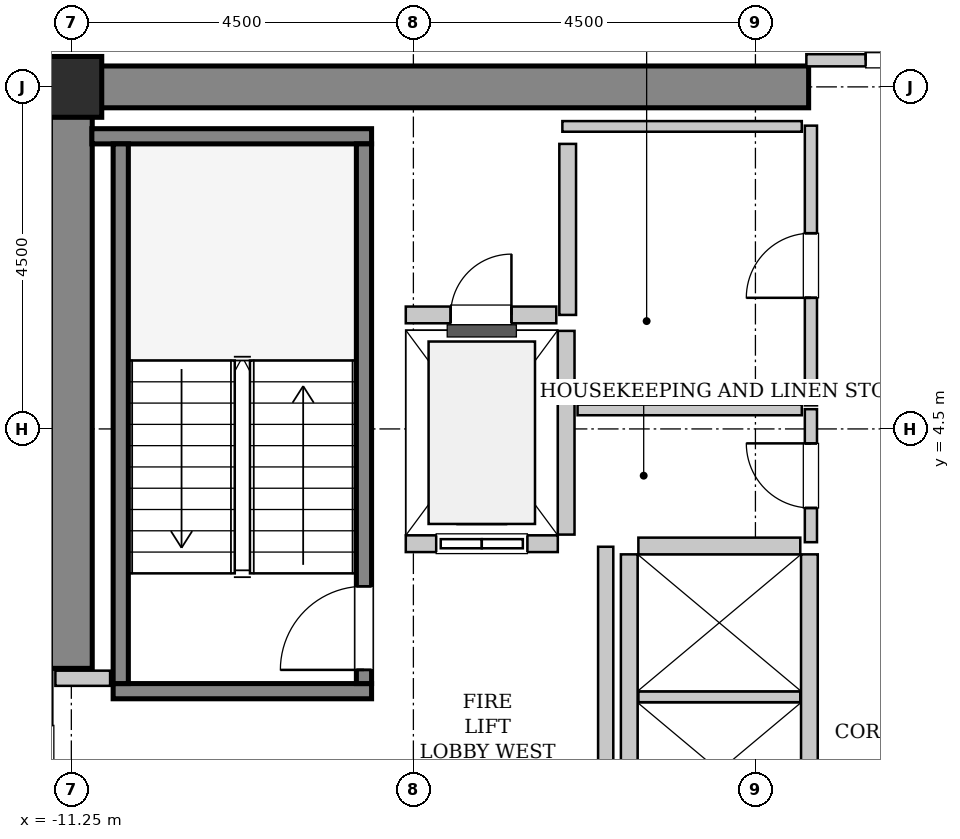
"""IFC4 building model, lengths in metres.
Left out: names, types, materials, properties, quantities, classifications, styles, units other than length and angle.
Written with IfcOpenShell. Run it as: python <this file> out.ifc"""

import sys

from ifc_helpers import new_model, si_unit, direction, frame, frame_2d, origin, origin_2d, place, context, subcontext, project, spatial, rectangle, hollow_rectangle, extrude, source, transform, mapped, element, fill, save


model = new_model("IFC4")
c1 = context("Model", 3, precision=1e-05, world=origin(), true_north=direction((0.0, 1.0)))
c2 = subcontext(c1, "Body", "Model", "MODEL_VIEW")
j1 = project(units=[si_unit("LENGTHUNIT", "METRE"), si_unit("PLANEANGLEUNIT", "RADIAN")], contexts=[c1])
p1 = place(None, origin())
s1 = spatial("IfcSite", under=j1, at=p1, CompositionType="ELEMENT")
p2 = place(p1, origin())
s2 = spatial("IfcBuilding", under=s1, at=p2, CompositionType="ELEMENT")
p3 = place(p2, frame((0.0, 0.0, 198.2)))
s3 = spatial("IfcBuildingStorey", under=s2, at=p3, CompositionType="ELEMENT", Elevation=198.2)
m1 = source(origin(), c2, "Body", "SweptSolid", [
    extrude(rectangle(XDim=9.975, YDim=0.55, at=frame_2d((4.987, 0.0))), origin(), (0.0, 0.0, 1.0), 3.8),
])
p4 = place(p3, frame((-11.525, 9.0, 0.0), z_axis=(0.0, 0.0, 1.0), x_axis=(1.0, 0.0, 0.0)))
e1 = element("IfcWall", 1, at=p4, inside=s3, PredefinedType="SHEAR", context=c2, shape_type="MappedRepresentation", body=[
    mapped(m1, transform((0.0, 0.0, 0.0), x_axis=(1.0, 0.0, 0.0), y_axis=(0.0, 1.0, 0.0), z_axis=(0.0, 0.0, 1.0), scale=1.0)),
])
m2 = source(origin(), c2, "Body", "SweptSolid", [
    extrude(rectangle(XDim=7.375, YDim=0.55, at=frame_2d((3.688, 0.0))), origin(), (0.0, 0.0, 1.0), 3.8),
])
p5 = place(p3, frame((-11.25, 1.35, 0.0), z_axis=(0.0, 0.0, 1.0), x_axis=(0.0, 1.0, 0.0)))
e2 = element("IfcWall", 2, at=p5, inside=s3, PredefinedType="SHEAR", context=c2, shape_type="MappedRepresentation", body=[
    mapped(m2, transform((0.0, 0.0, 0.0), x_axis=(1.0, 0.0, 0.0), y_axis=(0.0, 1.0, 0.0), z_axis=(0.0, 0.0, 1.0), scale=1.0)),
])
m3 = source(origin(), c2, "Body", "SweptSolid", [
    extrude(hollow_rectangle(XDim=0.8, YDim=0.8, WallThickness=0.04, InnerFilletRadius=0.04, OuterFilletRadius=0.08, at=origin_2d()), origin(), (0.0, 0.0, 1.0), 3.8),
])
p6 = place(p3, frame((-11.25, 9.0, 0.0), z_axis=(0.0, 0.0, 1.0), x_axis=(1.0, 0.0, 0.0)))
e3 = element("IfcColumn", 3, at=p6, inside=s3, PredefinedType="COLUMN", context=c2, shape_type="MappedRepresentation", body=[
    mapped(m3, transform((0.0, 0.0, 0.0), x_axis=(1.0, 0.0, 0.0), y_axis=(0.0, 1.0, 0.0), z_axis=(0.0, 0.0, 1.0), scale=1.0)),
])
m4 = source(origin(), c2, "Body", "SweptSolid", [
    extrude(rectangle(XDim=3.4, YDim=0.2, at=frame_2d((1.7, 0.0))), origin(), (0.0, 0.0, 1.0), 3.8),
])
p7 = place(p3, frame((-7.3, 1.05, 0.0), z_axis=(0.0, 0.0, 1.0), x_axis=(-1.0, 0.0, 0.0)))
e4 = element("IfcWall", 4, at=p7, inside=s3, PredefinedType="SOLIDWALL", context=c2, shape_type="MappedRepresentation", body=[
    mapped(m4, transform((0.0, 0.0, 0.0), x_axis=(1.0, 0.0, 0.0), y_axis=(0.0, 1.0, 0.0), z_axis=(0.0, 0.0, 1.0), scale=1.0)),
])
m5 = source(origin(), c2, "Body", "SweptSolid", [
    extrude(rectangle(XDim=3.68, YDim=0.2, at=frame_2d((1.84, 0.0))), origin(), (0.0, 0.0, 1.0), 3.8),
])
p8 = place(p3, frame((-7.3, 8.35, 0.0), z_axis=(0.0, 0.0, 1.0), x_axis=(-1.0, 0.0, 0.0)))
e5 = element("IfcWall", 5, at=p8, inside=s3, PredefinedType="SOLIDWALL", context=c2, shape_type="MappedRepresentation", body=[
    mapped(m5, transform((0.0, 0.0, 0.0), x_axis=(1.0, 0.0, 0.0), y_axis=(0.0, 1.0, 0.0), z_axis=(0.0, 0.0, 1.0), scale=1.0)),
])
m6 = source(origin(), c2, "Body", "SweptSolid", [
    extrude(rectangle(XDim=7.1, YDim=0.2, at=frame_2d((3.55, 0.0))), origin(), (0.0, 0.0, 1.0), 3.8),
])
p9 = place(p3, frame((-7.4, 1.15, 0.0), z_axis=(0.0, 0.0, 1.0), x_axis=(0.0, 1.0, 0.0)))
e6 = element("IfcWall", 6, at=p9, inside=s3, PredefinedType="SOLIDWALL", context=c2, shape_type="MappedRepresentation", body=[
    mapped(m6, transform((0.0, 0.0, 0.0), x_axis=(1.0, 0.0, 0.0), y_axis=(0.0, 1.0, 0.0), z_axis=(0.0, 0.0, 1.0), scale=1.0)),
])
p10 = place(p9, frame((0.18, 0.0, 0.0)))
e7 = element("IfcOpeningElement", 7, at=p10, cuts=e6, PredefinedType="OPENING", context=c2, shape_type="SweptSolid", body=[
    extrude(rectangle(XDim=1.1, YDim=2.15, at=frame_2d((0.55, 1.075))), frame((0.0, 0.11, 0.0), z_axis=(0.0, -1.0, 0.0), x_axis=(1.0, 0.0, 0.0)), (0.0, 0.0, 1.0), 0.22),
])
p11 = place(p3, frame((-10.6, 1.15, 0.0), z_axis=(0.0, 0.0, 1.0), x_axis=(0.0, 1.0, 0.0)))
e8 = element("IfcWall", 8, at=p11, inside=s3, PredefinedType="SOLIDWALL", context=c2, shape_type="MappedRepresentation", body=[
    mapped(m6, transform((0.0, 0.0, 0.0), x_axis=(1.0, 0.0, 0.0), y_axis=(0.0, 1.0, 0.0), z_axis=(0.0, 0.0, 1.0), scale=1.0)),
])
m7 = source(origin(), c2, "Body", "SweptSolid", [
    extrude(rectangle(XDim=2.0, YDim=0.22, at=frame_2d((1.0, 0.0))), origin(), (0.0, 0.0, 1.0), 3.485),
])
p12 = place(p3, frame((-6.85, 2.99, 0.0), z_axis=(0.0, 0.0, 1.0), x_axis=(1.0, 0.0, 0.0)))
e9 = element("IfcWall", 9, at=p12, inside=s3, PredefinedType="SOLIDWALL", context=c2, shape_type="MappedRepresentation", body=[
    mapped(m7, transform((0.0, 0.0, 0.0), x_axis=(1.0, 0.0, 0.0), y_axis=(0.0, 1.0, 0.0), z_axis=(0.0, 0.0, 1.0), scale=1.0)),
])
p13 = place(p12, frame((0.4, 0.0, 0.0)))
e10 = element("IfcOpeningElement", 10, at=p13, cuts=e9, PredefinedType="OPENING", context=c2, shape_type="SweptSolid", body=[
    extrude(rectangle(XDim=1.2, YDim=2.2, at=frame_2d((0.6, 1.1))), frame((0.0, 0.12, 0.0), z_axis=(0.0, -1.0, 0.0), x_axis=(1.0, 0.0, 0.0)), (0.0, 0.0, 1.0), 0.24),
])
m8 = source(origin(), c2, "Body", "SweptSolid", [
    extrude(rectangle(XDim=2.68, YDim=0.22, at=frame_2d((1.34, 0.0))), origin(), (0.0, 0.0, 1.0), 3.485),
])
p14 = place(p3, frame((-4.74, 3.11, 0.0), z_axis=(0.0, 0.0, 1.0), x_axis=(0.0, 1.0, 0.0)))
e11 = element("IfcWall", 11, at=p14, inside=s3, PredefinedType="SOLIDWALL", context=c2, shape_type="MappedRepresentation", body=[
    mapped(m8, transform((0.0, 0.0, 0.0), x_axis=(1.0, 0.0, 0.0), y_axis=(0.0, 1.0, 0.0), z_axis=(0.0, 0.0, 1.0), scale=1.0)),
])
m9 = source(origin(), c2, "Body", "SweptSolid", [
    extrude(rectangle(XDim=5.7, YDim=0.22, at=frame_2d((2.85, 0.0))), origin(), (0.0, 0.0, 1.0), 3.485),
])
for number, where, z_axis, x_axis in (
    (12, (-1.54, -2.85, 0.0), (0.0, 0.0, 1.0), (0.0, 1.0, 0.0)),
    (13, (-3.91, 2.85, 0.0), (0.0, 0.0, 1.0), (0.0, -1.0, 0.0)),
):
    element("IfcWall", number, at=place(p3, frame(where, z_axis=z_axis, x_axis=x_axis)), inside=s3, PredefinedType="SOLIDWALL", context=c2, shape_type="MappedRepresentation", body=[
        mapped(m9, transform((0.0, 0.0, 0.0), x_axis=(1.0, 0.0, 0.0), y_axis=(0.0, 1.0, 0.0), z_axis=(0.0, 0.0, 1.0), scale=1.0)),
    ])
m10 = source(origin(), c2, "Body", "SweptSolid", [
    extrude(rectangle(XDim=2.13, YDim=0.14, at=frame_2d((1.065, 0.0))), origin(), (0.0, 0.0, 1.0), 3.485),
])
p15 = place(p3, frame((-3.79, 0.975, 0.0), z_axis=(0.0, 0.0, 1.0), x_axis=(1.0, 0.0, 0.0)))
e14 = element("IfcWall", 14, at=p15, inside=s3, PredefinedType="PARTITIONING", context=c2, shape_type="MappedRepresentation", body=[
    mapped(m10, transform((0.0, 0.0, 0.0), x_axis=(1.0, 0.0, 0.0), y_axis=(0.0, 1.0, 0.0), z_axis=(0.0, 0.0, 1.0), scale=1.0)),
])
m11 = source(origin(), c2, "Body", "SweptSolid", [
    extrude(rectangle(XDim=2.13, YDim=0.22, at=frame_2d((1.065, 0.0))), origin(), (0.0, 0.0, 1.0), 3.485),
])
p16 = place(p3, frame((-1.66, 2.96, 0.0), z_axis=(0.0, 0.0, 1.0), x_axis=(-1.0, 0.0, 0.0)))
e15 = element("IfcWall", 15, at=p16, inside=s3, PredefinedType="SOLIDWALL", context=c2, shape_type="MappedRepresentation", body=[
    mapped(m11, transform((0.0, 0.0, 0.0), x_axis=(1.0, 0.0, 0.0), y_axis=(0.0, 1.0, 0.0), z_axis=(0.0, 0.0, 1.0), scale=1.0)),
])
m12 = source(origin(), c2, "Body", "SweptSolid", [
    extrude(rectangle(XDim=2.25, YDim=0.22, at=frame_2d((1.125, 0.0))), origin(), (0.0, 0.0, 1.0), 3.485),
])
p17 = place(p3, frame((-4.72, 6.0, 0.0), z_axis=(0.0, 0.0, 1.0), x_axis=(0.0, 1.0, 0.0)))
e16 = element("IfcWall", 16, at=p17, inside=s3, PredefinedType="SOLIDWALL", context=c2, shape_type="MappedRepresentation", body=[
    mapped(m12, transform((0.0, 0.0, 0.0), x_axis=(1.0, 0.0, 0.0), y_axis=(0.0, 1.0, 0.0), z_axis=(0.0, 0.0, 1.0), scale=1.0)),
])
m13 = source(origin(), c2, "Body", "SweptSolid", [
    extrude(rectangle(XDim=1.98, YDim=0.22, at=frame_2d((0.99, 0.0))), origin(), (0.0, 0.0, 1.0), 3.485),
])
p18 = place(p3, frame((-6.85, 6.0, 0.0), z_axis=(0.0, 0.0, 1.0), x_axis=(1.0, 0.0, 0.0)))
e17 = element("IfcWall", 17, at=p18, inside=s3, PredefinedType="SOLIDWALL", context=c2, shape_type="MappedRepresentation", body=[
    mapped(m13, transform((0.0, 0.0, 0.0), x_axis=(1.0, 0.0, 0.0), y_axis=(0.0, 1.0, 0.0), z_axis=(0.0, 0.0, 1.0), scale=1.0)),
])
p19 = place(p18, frame((0.59, 0.0, 0.0)))
e18 = element("IfcOpeningElement", 18, at=p19, cuts=e17, PredefinedType="OPENING", context=c2, shape_type="SweptSolid", body=[
    extrude(rectangle(XDim=0.8, YDim=2.0, at=frame_2d((0.4, 1.0))), frame((0.0, 0.12, 0.0), z_axis=(0.0, -1.0, 0.0), x_axis=(1.0, 0.0, 0.0)), (0.0, 0.0, 1.0), 0.24),
])
m14 = source(origin(), c2, "Body", "SweptSolid", [
    extrude(rectangle(XDim=5.9, YDim=0.2, at=frame_2d((2.95, 0.0))), origin(), (0.0, 0.0, 1.0), 3.485),
])
p20 = place(p3, frame((-4.22, -2.95, 0.0), z_axis=(0.0, 0.0, 1.0), x_axis=(0.0, 1.0, 0.0)))
e19 = element("IfcWall", 19, at=p20, inside=s3, PredefinedType="PARTITIONING", context=c2, shape_type="MappedRepresentation", body=[
    mapped(m14, transform((0.0, 0.0, 0.0), x_axis=(1.0, 0.0, 0.0), y_axis=(0.0, 1.0, 0.0), z_axis=(0.0, 0.0, 1.0), scale=1.0)),
])
m15 = source(origin(), c2, "Body", "SweptSolid", [
    extrude(rectangle(XDim=0.72, YDim=0.2, at=frame_2d((0.36, 0.0))), origin(), (0.0, 0.0, 1.0), 3.485),
])
p21 = place(p3, frame((-11.46, 1.22, 0.0), z_axis=(0.0, 0.0, 1.0), x_axis=(1.0, 0.0, 0.0)))
e20 = element("IfcWall", 20, at=p21, inside=s3, PredefinedType="PARTITIONING", context=c2, shape_type="MappedRepresentation", body=[
    mapped(m15, transform((0.0, 0.0, 0.0), x_axis=(1.0, 0.0, 0.0), y_axis=(0.0, 1.0, 0.0), z_axis=(0.0, 0.0, 1.0), scale=1.0)),
])
m16 = source(origin(), c2, "Body", "SweptSolid", [
    extrude(rectangle(XDim=3.16, YDim=0.16, at=frame_2d((1.58, 0.0))), origin(), (0.0, 0.0, 1.0), 2.375),
])
p22 = place(p3, frame((-1.58, 9.35, 0.0), z_axis=(0.0, 0.0, 1.0), x_axis=(1.0, 0.0, 0.0)))
e21 = element("IfcWall", 21, at=p22, inside=s3, PredefinedType="PARTITIONING", context=c2, shape_type="MappedRepresentation", body=[
    mapped(m16, transform((0.0, 0.0, 0.0), x_axis=(1.0, 0.0, 0.0), y_axis=(0.0, 1.0, 0.0), z_axis=(0.0, 0.0, 1.0), scale=1.0)),
])
p23 = place(p22, frame((0.78, 0.0, 0.0)))
e22 = element("IfcOpeningElement", 22, at=p23, cuts=e21, PredefinedType="OPENING", context=c2, shape_type="SweptSolid", body=[
    extrude(rectangle(XDim=1.6, YDim=2.3, at=frame_2d((0.8, 1.15))), frame((0.0, 0.09, 0.0), z_axis=(0.0, -1.0, 0.0), x_axis=(1.0, 0.0, 0.0)), (0.0, 0.0, 1.0), 0.18),
])
m17 = source(origin(), c2, "Body", "SweptSolid", [
    extrude(rectangle(XDim=1.75, YDim=0.16, at=frame_2d((0.875, 0.0))), origin(), (0.0, 0.0, 1.0), 3.485),
])
p24 = place(p3, frame((-1.52, 3.01, 0.0), z_axis=(0.0, 0.0, 1.0), x_axis=(0.0, 1.0, 0.0)))
e23 = element("IfcWall", 23, at=p24, inside=s3, PredefinedType="PARTITIONING", context=c2, shape_type="MappedRepresentation", body=[
    mapped(m17, transform((0.0, 0.0, 0.0), x_axis=(1.0, 0.0, 0.0), y_axis=(0.0, 1.0, 0.0), z_axis=(0.0, 0.0, 1.0), scale=1.0)),
])
p25 = place(p24, frame((0.45, 0.0, 0.0)))
e24 = element("IfcOpeningElement", 24, at=p25, cuts=e23, PredefinedType="OPENING", context=c2, shape_type="SweptSolid", body=[
    extrude(rectangle(XDim=0.85, YDim=2.1, at=frame_2d((0.425, 1.05))), frame((0.0, 0.09, 0.0), z_axis=(0.0, -1.0, 0.0), x_axis=(1.0, 0.0, 0.0)), (0.0, 0.0, 1.0), 0.18),
])
m18 = source(origin(), c2, "Body", "SweptSolid", [
    extrude(rectangle(XDim=2.95, YDim=0.14, at=frame_2d((1.475, 0.0))), origin(), (0.0, 0.0, 1.0), 3.485),
])
p26 = place(p3, frame((-4.59, 4.75, 0.0), z_axis=(0.0, 0.0, 1.0), x_axis=(1.0, 0.0, 0.0)))
e25 = element("IfcWall", 25, at=p26, inside=s3, PredefinedType="PARTITIONING", context=c2, shape_type="MappedRepresentation", body=[
    mapped(m18, transform((0.0, 0.0, 0.0), x_axis=(1.0, 0.0, 0.0), y_axis=(0.0, 1.0, 0.0), z_axis=(0.0, 0.0, 1.0), scale=1.0)),
])
m19 = source(origin(), c2, "Body", "SweptSolid", [
    extrude(rectangle(XDim=3.68, YDim=0.16, at=frame_2d((1.84, 0.0))), origin(), (0.0, 0.0, 1.0), 3.485),
])
p27 = place(p3, frame((-1.52, 4.81, 0.0), z_axis=(0.0, 0.0, 1.0), x_axis=(0.0, 1.0, 0.0)))
e26 = element("IfcWall", 26, at=p27, inside=s3, PredefinedType="PARTITIONING", context=c2, shape_type="MappedRepresentation", body=[
    mapped(m19, transform((0.0, 0.0, 0.0), x_axis=(1.0, 0.0, 0.0), y_axis=(0.0, 1.0, 0.0), z_axis=(0.0, 0.0, 1.0), scale=1.0)),
])
p28 = place(p27, frame((1.415, 0.0, 0.0)))
e27 = element("IfcOpeningElement", 27, at=p28, cuts=e26, PredefinedType="OPENING", context=c2, shape_type="SweptSolid", body=[
    extrude(rectangle(XDim=0.85, YDim=2.1, at=frame_2d((0.425, 1.05))), frame((0.0, 0.09, 0.0), z_axis=(0.0, -1.0, 0.0), x_axis=(1.0, 0.0, 0.0)), (0.0, 0.0, 1.0), 0.18),
])
m20 = source(origin(), c2, "Body", "SweptSolid", [
    extrude(rectangle(XDim=3.15, YDim=0.14, at=frame_2d((1.575, 0.0))), origin(), (0.0, 0.0, 1.0), 3.485),
])
p29 = place(p3, frame((-4.79, 8.48, 0.0), z_axis=(0.0, 0.0, 1.0), x_axis=(1.0, 0.0, 0.0)))
e28 = element("IfcWall", 28, at=p29, inside=s3, PredefinedType="PARTITIONING", context=c2, shape_type="MappedRepresentation", body=[
    mapped(m20, transform((0.0, 0.0, 0.0), x_axis=(1.0, 0.0, 0.0), y_axis=(0.0, 1.0, 0.0), z_axis=(0.0, 0.0, 1.0), scale=1.0)),
])
m21 = source(origin(), c2, "Body", "SweptSolid", [
    extrude(rectangle(XDim=1.1, YDim=2.15, at=frame_2d((0.55, 1.075))), frame((0.0, 0.025, 0.0), z_axis=(0.0, -1.0, 0.0), x_axis=(1.0, 0.0, 0.0)), (0.0, 0.0, 1.0), 0.05),
])
p30 = place(p10, origin())
e29 = element("IfcDoor", 29, at=p30, inside=s3, OperationType="SINGLE_SWING_LEFT", PredefinedType="DOOR", context=c2, shape_type="MappedRepresentation", body=[
    mapped(m21, transform((0.0, 0.0, 0.0), x_axis=(1.0, 0.0, 0.0), y_axis=(0.0, 1.0, 0.0), z_axis=(0.0, 0.0, 1.0), scale=1.0)),
])
fill(e7, e29)
m22 = source(origin(), c2, "Body", "SweptSolid", [
    extrude(rectangle(XDim=1.2, YDim=2.2, at=frame_2d((0.6, 1.1))), frame((0.0, 0.025, 0.0), z_axis=(0.0, -1.0, 0.0), x_axis=(1.0, 0.0, 0.0)), (0.0, 0.0, 1.0), 0.05),
])
p31 = place(p13, origin())
e30 = element("IfcDoor", 30, at=p31, inside=s3, OperationType="SLIDING_TO_LEFT", PredefinedType="DOOR", context=c2, shape_type="MappedRepresentation", body=[
    mapped(m22, transform((0.0, 0.0, 0.0), x_axis=(1.0, 0.0, 0.0), y_axis=(0.0, 1.0, 0.0), z_axis=(0.0, 0.0, 1.0), scale=1.0)),
])
fill(e10, e30)
m23 = source(origin(), c2, "Body", "SweptSolid", [
    extrude(rectangle(XDim=0.8, YDim=2.0, at=frame_2d((0.4, 1.0))), frame((0.0, 0.025, 0.0), z_axis=(0.0, -1.0, 0.0), x_axis=(1.0, 0.0, 0.0)), (0.0, 0.0, 1.0), 0.05),
])
p32 = place(p19, origin())
e31 = element("IfcDoor", 31, at=p32, inside=s3, OperationType="SINGLE_SWING_RIGHT", PredefinedType="TRAPDOOR", context=c2, shape_type="MappedRepresentation", body=[
    mapped(m23, transform((0.0, 0.0, 0.0), x_axis=(1.0, 0.0, 0.0), y_axis=(0.0, 1.0, 0.0), z_axis=(0.0, 0.0, 1.0), scale=1.0)),
])
fill(e18, e31)
m24 = source(origin(), c2, "Body", "SweptSolid", [
    extrude(rectangle(XDim=1.6, YDim=2.3, at=frame_2d((0.8, 1.15))), frame((0.0, 0.025, 0.0), z_axis=(0.0, -1.0, 0.0), x_axis=(1.0, 0.0, 0.0)), (0.0, 0.0, 1.0), 0.05),
])
p33 = place(p23, origin())
e32 = element("IfcDoor", 32, at=p33, inside=s3, OperationType="DOUBLE_DOOR_SINGLE_SWING", PredefinedType="DOOR", context=c2, shape_type="MappedRepresentation", body=[
    mapped(m24, transform((0.0, 0.0, 0.0), x_axis=(1.0, 0.0, 0.0), y_axis=(0.0, 1.0, 0.0), z_axis=(0.0, 0.0, 1.0), scale=1.0)),
])
fill(e22, e32)
m25 = source(origin(), c2, "Body", "SweptSolid", [
    extrude(rectangle(XDim=0.85, YDim=2.1, at=frame_2d((0.425, 1.05))), frame((0.0, 0.025, 0.0), z_axis=(0.0, -1.0, 0.0), x_axis=(1.0, 0.0, 0.0)), (0.0, 0.0, 1.0), 0.05),
])
p34 = place(p25, origin())
e33 = element("IfcDoor", 33, at=p34, inside=s3, OperationType="SINGLE_SWING_RIGHT", PredefinedType="DOOR", context=c2, shape_type="MappedRepresentation", body=[
    mapped(m25, transform((0.0, 0.0, 0.0), x_axis=(1.0, 0.0, 0.0), y_axis=(0.0, 1.0, 0.0), z_axis=(0.0, 0.0, 1.0), scale=1.0)),
])
fill(e24, e33)
p35 = place(p28, origin())
e34 = element("IfcDoor", 34, at=p35, inside=s3, OperationType="SINGLE_SWING_LEFT", PredefinedType="DOOR", context=c2, shape_type="MappedRepresentation", body=[
    mapped(m25, transform((0.0, 0.0, 0.0), x_axis=(1.0, 0.0, 0.0), y_axis=(0.0, 1.0, 0.0), z_axis=(0.0, 0.0, 1.0), scale=1.0)),
])
fill(e27, e34)
save(model, sys.argv[1])
